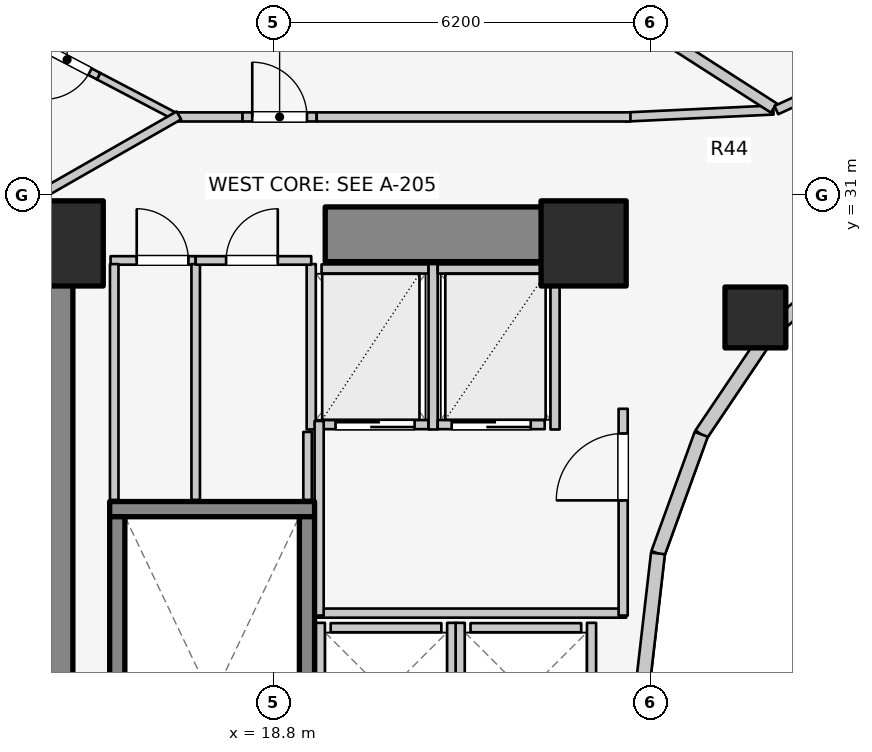
"""IFC4 building model, lengths in metres.
Left out: names, types, materials, properties, quantities, classifications, styles, units other than length and angle.
Written with IfcOpenShell. Run it as: python <this file> out.ifc"""

import sys

from ifc_helpers import new_model, si_unit, direction, frame, frame_2d, origin, origin_2d, place, context, subcontext, project, spatial, rectangle, extrude, element, fill, save


model = new_model("IFC4")
c1 = context("Model", 3, precision=1e-05, world=origin(), true_north=direction((0.0, 1.0)))
c2 = subcontext(c1, "Body", "Model", "MODEL_VIEW")
j1 = project(units=[si_unit("LENGTHUNIT", "METRE"), si_unit("PLANEANGLEUNIT", "RADIAN")], contexts=[c1])
p1 = place(None, origin())
s1 = spatial("IfcSite", under=j1, at=p1, CompositionType="ELEMENT")
p2 = place(p1, origin())
s2 = spatial("IfcBuilding", under=s1, at=p2, CompositionType="ELEMENT")
p3 = place(p2, frame((0.0, 0.0, 52.4)))
s3 = spatial("IfcBuildingStorey", under=s2, at=p3, CompositionType="ELEMENT", Elevation=52.4)
p4 = place(p3, frame((15.05, 17.05, 0.0), z_axis=(0.0, 0.0, 1.0), x_axis=(0.0, 1.0, 0.0)))
e1 = element("IfcWall", 1, at=p4, inside=s3, PredefinedType="SHEAR", context=c2, shape_type="SweptSolid", body=[
    extrude(rectangle(XDim=12.8, YDim=0.9, at=frame_2d((6.4, 0.0))), origin(), (0.0, 0.0, 1.0), 3.1),
])
p5 = place(p3, frame((19.65, 30.35, 0.0), z_axis=(0.0, 0.0, 1.0), x_axis=(1.0, 0.0, 0.0)))
e2 = element("IfcWall", 2, at=p5, inside=s3, PredefinedType="SHEAR", context=c2, shape_type="SweptSolid", body=[
    extrude(rectangle(XDim=4.5, YDim=0.9, at=frame_2d((2.25, 0.0))), origin(), (0.0, 0.0, 1.0), 3.1),
])
p6 = place(p3, frame((16.105, 25.83, 0.0), z_axis=(0.0, 0.0, 1.0), x_axis=(1.0, 0.0, 0.0)))
e3 = element("IfcWall", 3, at=p6, inside=s3, PredefinedType="SOLIDWALL", context=c2, shape_type="SweptSolid", body=[
    extrude(rectangle(XDim=3.37, YDim=0.25, at=frame_2d((1.685, 0.0))), origin(), (0.0, 0.0, 1.0), 3.1),
])
for number, where, z_axis, x_axis in (
    (4, (16.23, 17.895, 0.0), (0.0, 0.0, 1.0), (0.0, 1.0, 0.0)),
    (5, (19.35, 17.895, 0.0), (0.0, 0.0, 1.0), (0.0, 1.0, 0.0)),
):
    element("IfcWall", number, at=place(p3, frame(where, z_axis=z_axis, x_axis=x_axis)), inside=s3, PredefinedType="SOLIDWALL", context=c2, shape_type="SweptSolid", body=[
        extrude(rectangle(XDim=7.81, YDim=0.25, at=frame_2d((3.905, 0.0))), origin(), (0.0, 0.0, 1.0), 3.1),
    ])
for number, where, z_axis, x_axis in (
    (6, (23.9, 30.2, 0.0), (0.0, 0.0, 1.0), (1.0, 0.0, 0.0)),
    (7, (15.3, 30.2, 0.0), (0.0, 0.0, 1.0), (1.0, 0.0, 0.0)),
):
    element("IfcColumn", number, at=place(p3, frame(where, z_axis=z_axis, x_axis=x_axis)), inside=s3, PredefinedType="COLUMN", context=c2, shape_type="SweptSolid", body=[
        extrude(rectangle(XDim=1.4, YDim=1.4, at=origin_2d()), origin(), (0.0, 0.0, 1.0), 3.1),
    ])
p7 = place(p3, frame((26.725, 28.982, 0.0), z_axis=(0.0, 0.0, 1.0), x_axis=(1.0, 0.0, 0.0)))
e8 = element("IfcColumn", 8, at=p7, inside=s3, PredefinedType="COLUMN", context=c2, shape_type="SweptSolid", body=[
    extrude(rectangle(XDim=1.0, YDim=1.0, at=origin_2d()), origin(), (0.0, 0.0, 1.0), 3.1),
])
p8 = place(p3, frame((28.44, 30.032, 0.0), z_axis=(0.0, 0.0, 1.0), x_axis=(-0.752576694707, -0.658504607869, 0.0)))
e9 = element("IfcWall", 9, at=p8, inside=s3, PredefinedType="STANDARD", context=c2, shape_type="SweptSolid", body=[
    extrude(rectangle(XDim=1.959, YDim=0.23, at=frame_2d((0.98, 0.0))), origin(), (0.0, 0.0, 1.0), 1.22),
])
p9 = place(p3, frame((26.965, 28.742, 0.0), z_axis=(0.0, 0.0, 1.0), x_axis=(-0.558197800898, -0.829707909492, 0.0)))
e10 = element("IfcWall", 10, at=p9, inside=s3, PredefinedType="STANDARD", context=c2, shape_type="SweptSolid", body=[
    extrude(rectangle(XDim=2.027, YDim=0.23, at=frame_2d((1.013, 0.0))), origin(), (0.0, 0.0, 1.0), 1.22),
])
p10 = place(p3, frame((25.834, 27.06, 0.0), z_axis=(0.0, 0.0, 1.0), x_axis=(-0.341423187295, -0.93990968033, 0.0)))
e11 = element("IfcWall", 11, at=p10, inside=s3, PredefinedType="STANDARD", context=c2, shape_type="SweptSolid", body=[
    extrude(rectangle(XDim=2.084, YDim=0.23, at=frame_2d((1.042, 0.0))), origin(), (0.0, 0.0, 1.0), 2.56),
])
p11 = place(p3, frame((25.123, 25.102, 0.0), z_axis=(0.0, 0.0, 1.0), x_axis=(-0.114711713601, -0.993398823617, 0.0)))
e12 = element("IfcWall", 12, at=p11, inside=s3, PredefinedType="STANDARD", context=c2, shape_type="SweptSolid", body=[
    extrude(rectangle(XDim=2.115, YDim=0.23, at=frame_2d((1.058, 0.0))), origin(), (0.0, 0.0, 1.0), 2.56),
])
p12 = place(p3, frame((19.74, 23.88, 0.0), z_axis=(0.0, 0.0, 1.0), x_axis=(1.0, 0.0, 0.0)))
e13 = element("IfcWall", 13, at=p12, inside=s3, PredefinedType="SOLIDWALL", context=c2, shape_type="SweptSolid", body=[
    extrude(rectangle(XDim=1.82, YDim=0.15, at=frame_2d((0.91, 0.0))), origin(), (0.0, 0.0, 1.0), 2.575),
])
for number, where, z_axis, x_axis in (
    (14, (19.57, 21.64, 0.0), (0.0, 0.0, 1.0), (0.0, 1.0, 0.0)),
    (15, (21.73, 21.64, 0.0), (0.0, 0.0, 1.0), (0.0, 1.0, 0.0)),
):
    element("IfcWall", number, at=place(p3, frame(where, z_axis=z_axis, x_axis=x_axis)), inside=s3, PredefinedType="SOLIDWALL", context=c2, shape_type="SweptSolid", body=[
        extrude(rectangle(XDim=2.32, YDim=0.15, at=frame_2d((1.16, 0.0))), origin(), (0.0, 0.0, 1.0), 2.575),
    ])
p13 = place(p3, frame((22.04, 23.88, 0.0), z_axis=(0.0, 0.0, 1.0), x_axis=(1.0, 0.0, 0.0)))
e16 = element("IfcWall", 16, at=p13, inside=s3, PredefinedType="SOLIDWALL", context=c2, shape_type="SweptSolid", body=[
    extrude(rectangle(XDim=1.82, YDim=0.15, at=frame_2d((0.91, 0.0))), origin(), (0.0, 0.0, 1.0), 2.12),
])
p14 = place(p3, frame((21.87, 21.64, 0.0), z_axis=(0.0, 0.0, 1.0), x_axis=(0.0, 1.0, 0.0)))
e17 = element("IfcWall", 17, at=p14, inside=s3, PredefinedType="SOLIDWALL", context=c2, shape_type="SweptSolid", body=[
    extrude(rectangle(XDim=2.32, YDim=0.15, at=frame_2d((1.16, 0.0))), origin(), (0.0, 0.0, 1.0), 2.575),
])
p15 = place(p3, frame((24.03, 21.64, 0.0), z_axis=(0.0, 0.0, 1.0), x_axis=(0.0, 1.0, 0.0)))
e18 = element("IfcWall", 18, at=p15, inside=s3, PredefinedType="SOLIDWALL", context=c2, shape_type="SweptSolid", body=[
    extrude(rectangle(XDim=2.32, YDim=0.15, at=frame_2d((1.16, 0.0))), origin(), (0.0, 0.0, 1.0), 2.12),
])
p16 = place(p3, frame((19.59, 27.22, 0.0), z_axis=(0.0, 0.0, 1.0), x_axis=(1.0, 0.0, 0.0)))
e19 = element("IfcWall", 19, at=p16, inside=s3, PredefinedType="SOLIDWALL", context=c2, shape_type="SweptSolid", body=[
    extrude(rectangle(XDim=1.76, YDim=0.15, at=frame_2d((0.88, 0.0))), origin(), (0.0, 0.0, 1.0), 2.575),
])
p17 = place(p16, frame((0.23, 0.0, 0.0)))
e20 = element("IfcOpeningElement", 20, at=p17, cuts=e19, PredefinedType="OPENING", context=c2, shape_type="SweptSolid", body=[
    extrude(rectangle(XDim=1.3, YDim=2.1, at=frame_2d((0.65, 1.05))), frame((0.0, 0.085, 0.0), z_axis=(0.0, -1.0, 0.0), x_axis=(1.0, 0.0, 0.0)), (0.0, 0.0, 1.0), 0.17),
])
p18 = place(p3, frame((19.59, 29.78, 0.0), z_axis=(0.0, 0.0, 1.0), x_axis=(1.0, 0.0, 0.0)))
e21 = element("IfcWall", 21, at=p18, inside=s3, PredefinedType="SOLIDWALL", context=c2, shape_type="SweptSolid", body=[
    extrude(rectangle(XDim=1.76, YDim=0.15, at=frame_2d((0.88, 0.0))), origin(), (0.0, 0.0, 1.0), 2.575),
])
for number, where, z_axis, x_axis in (
    (22, (19.42, 27.14, 0.0), (0.0, 0.0, 1.0), (0.0, 1.0, 0.0)),
    (23, (21.425, 27.14, 0.0), (0.0, 0.0, 1.0), (0.0, 1.0, 0.0)),
):
    element("IfcWall", number, at=place(p3, frame(where, z_axis=z_axis, x_axis=x_axis)), inside=s3, PredefinedType="SOLIDWALL", context=c2, shape_type="SweptSolid", body=[
        extrude(rectangle(XDim=2.72, YDim=0.15, at=frame_2d((1.36, 0.0))), origin(), (0.0, 0.0, 1.0), 2.575),
    ])
p19 = place(p3, frame((21.5, 27.22, 0.0), z_axis=(0.0, 0.0, 1.0), x_axis=(1.0, 0.0, 0.0)))
e24 = element("IfcWall", 24, at=p19, inside=s3, PredefinedType="SOLIDWALL", context=c2, shape_type="SweptSolid", body=[
    extrude(rectangle(XDim=1.76, YDim=0.15, at=frame_2d((0.88, 0.0))), origin(), (0.0, 0.0, 1.0), 2.575),
])
p20 = place(p19, frame((0.23, 0.0, 0.0)))
e25 = element("IfcOpeningElement", 25, at=p20, cuts=e24, PredefinedType="OPENING", context=c2, shape_type="SweptSolid", body=[
    extrude(rectangle(XDim=1.3, YDim=2.1, at=frame_2d((0.65, 1.05))), frame((0.0, 0.085, 0.0), z_axis=(0.0, -1.0, 0.0), x_axis=(1.0, 0.0, 0.0)), (0.0, 0.0, 1.0), 0.17),
])
p21 = place(p3, frame((21.5, 29.78, 0.0), z_axis=(0.0, 0.0, 1.0), x_axis=(1.0, 0.0, 0.0)))
e26 = element("IfcWall", 26, at=p21, inside=s3, PredefinedType="SOLIDWALL", context=c2, shape_type="SweptSolid", body=[
    extrude(rectangle(XDim=1.76, YDim=0.15, at=frame_2d((0.88, 0.0))), origin(), (0.0, 0.0, 1.0), 2.575),
])
p22 = place(p3, frame((23.43, 27.14, 0.0), z_axis=(0.0, 0.0, 1.0), x_axis=(0.0, 1.0, 0.0)))
e27 = element("IfcWall", 27, at=p22, inside=s3, PredefinedType="SOLIDWALL", context=c2, shape_type="SweptSolid", body=[
    extrude(rectangle(XDim=2.72, YDim=0.15, at=frame_2d((1.36, 0.0))), origin(), (0.0, 0.0, 1.0), 2.575),
])
p23 = place(p3, frame((19.52, 24.12, 0.0), z_axis=(0.0, 0.0, 1.0), x_axis=(1.0, 0.0, 0.0)))
e28 = element("IfcWall", 28, at=p23, inside=s3, PredefinedType="PARTITIONING", context=c2, shape_type="SweptSolid", body=[
    extrude(rectangle(XDim=5.08, YDim=0.15, at=frame_2d((2.54, 0.0))), origin(), (0.0, 0.0, 1.0), 2.12),
])
p24 = place(p3, frame((19.55, 24.08, 0.0), z_axis=(0.0, 0.0, 1.0), x_axis=(0.0, 1.0, 0.0)))
e29 = element("IfcWall", 29, at=p24, inside=s3, PredefinedType="PARTITIONING", context=c2, shape_type="SweptSolid", body=[
    extrude(rectangle(XDim=3.2, YDim=0.15, at=frame_2d((1.6, 0.0))), origin(), (0.0, 0.0, 1.0), 2.575),
])
p25 = place(p3, frame((24.55, 24.08, 0.0), z_axis=(0.0, 0.0, 1.0), x_axis=(0.0, 1.0, 0.0)))
e30 = element("IfcWall", 30, at=p25, inside=s3, PredefinedType="PARTITIONING", context=c2, shape_type="SweptSolid", body=[
    extrude(rectangle(XDim=3.4, YDim=0.15, at=frame_2d((1.7, 0.0))), origin(), (0.0, 0.0, 1.0), 2.575),
])
p26 = place(p25, frame((1.894, 0.0, 0.0)))
e31 = element("IfcOpeningElement", 31, at=p26, cuts=e30, PredefinedType="OPENING", context=c2, shape_type="SweptSolid", body=[
    extrude(rectangle(XDim=1.1, YDim=2.1, at=frame_2d((0.55, 1.05))), frame((0.0, 0.085, 0.0), z_axis=(0.0, -1.0, 0.0), x_axis=(1.0, 0.0, 0.0)), (0.0, 0.0, 1.0), 0.17),
])
p27 = place(p3, frame((16.12, 29.92, 0.0), z_axis=(0.0, 0.0, 1.0), x_axis=(1.0, 0.0, 0.0)))
e32 = element("IfcWall", 32, at=p27, inside=s3, PredefinedType="PLUMBINGWALL", context=c2, shape_type="SweptSolid", body=[
    extrude(rectangle(XDim=1.4, YDim=0.14, at=frame_2d((0.7, 0.0))), origin(), (0.0, 0.0, 1.0), 2.575),
])
p28 = place(p27, frame((0.43, 0.0, 0.0)))
e33 = element("IfcOpeningElement", 33, at=p28, cuts=e32, PredefinedType="OPENING", context=c2, shape_type="SweptSolid", body=[
    extrude(rectangle(XDim=0.85, YDim=2.05, at=frame_2d((0.425, 1.025))), frame((0.0, 0.08, 0.0), z_axis=(0.0, -1.0, 0.0), x_axis=(1.0, 0.0, 0.0)), (0.0, 0.0, 1.0), 0.16),
])
for number, where, z_axis, x_axis in (
    (34, (16.18, 25.98, 0.0), (0.0, 0.0, 1.0), (0.0, 1.0, 0.0)),
    (35, (17.52, 25.98, 0.0), (0.0, 0.0, 1.0), (0.0, 1.0, 0.0)),
):
    element("IfcWall", number, at=place(p3, frame(where, z_axis=z_axis, x_axis=x_axis)), inside=s3, PredefinedType="PLUMBINGWALL", context=c2, shape_type="SweptSolid", body=[
        extrude(rectangle(XDim=3.88, YDim=0.14, at=frame_2d((1.94, 0.0))), origin(), (0.0, 0.0, 1.0), 2.575),
    ])
p29 = place(p3, frame((17.52, 29.92, 0.0), z_axis=(0.0, 0.0, 1.0), x_axis=(1.0, 0.0, 0.0)))
e36 = element("IfcWall", 36, at=p29, inside=s3, PredefinedType="PLUMBINGWALL", context=c2, shape_type="SweptSolid", body=[
    extrude(rectangle(XDim=1.9, YDim=0.14, at=frame_2d((0.95, 0.0))), origin(), (0.0, 0.0, 1.0), 2.575),
])
p30 = place(p29, frame((0.5, 0.0, 0.0)))
e37 = element("IfcOpeningElement", 37, at=p30, cuts=e36, PredefinedType="OPENING", context=c2, shape_type="SweptSolid", body=[
    extrude(rectangle(XDim=0.85, YDim=2.05, at=frame_2d((0.425, 1.025))), frame((0.0, 0.08, 0.0), z_axis=(0.0, -1.0, 0.0), x_axis=(1.0, 0.0, 0.0)), (0.0, 0.0, 1.0), 0.16),
])
p31 = place(p3, frame((19.36, 25.98, 0.0), z_axis=(0.0, 0.0, 1.0), x_axis=(0.0, 1.0, 0.0)))
e38 = element("IfcWall", 38, at=p31, inside=s3, PredefinedType="PLUMBINGWALL", context=c2, shape_type="SweptSolid", body=[
    extrude(rectangle(XDim=1.12, YDim=0.14, at=frame_2d((0.56, 0.0))), origin(), (0.0, 0.0, 1.0), 2.575),
])
p32 = place(p3, frame((17.244, 32.257, 0.0), z_axis=(0.0, 0.0, 1.0), x_axis=(-0.885552742751, 0.464538846391, 0.0)))
e39 = element("IfcWall", 39, at=p32, inside=s3, PredefinedType="MOVABLE", context=c2, shape_type="SweptSolid", body=[
    extrude(rectangle(XDim=1.492, YDim=0.12, at=frame_2d((0.746, 0.0))), origin(), (0.0, 0.0, 1.0), 2.575),
])
p33 = place(p3, frame((15.923, 32.95, 0.0), z_axis=(0.0, 0.0, 1.0), x_axis=(-0.885533150024, 0.464576194191, 0.0)))
e40 = element("IfcWall", 40, at=p33, inside=s3, PredefinedType="MOVABLE", context=c2, shape_type="SweptSolid", body=[
    extrude(rectangle(XDim=1.17, YDim=0.12, at=frame_2d((0.585, 0.0))), origin(), (0.0, 0.0, 1.0), 2.11),
])
p34 = place(p33, frame((0.16, 0.0, 0.0)))
e41 = element("IfcOpeningElement", 41, at=p34, cuts=e40, PredefinedType="OPENING", context=c2, shape_type="SweptSolid", body=[
    extrude(rectangle(XDim=0.85, YDim=2.05, at=frame_2d((0.425, 1.025))), frame((0.0, 0.07, 0.0), z_axis=(0.0, -1.0, 0.0), x_axis=(1.0, 0.0, 0.0)), (0.0, 0.0, 1.0), 0.14),
])
p35 = place(p3, frame((27.02, 32.394, 0.0), z_axis=(0.0, 0.0, 1.0), x_axis=(-0.998877427952, -0.047369651964, 0.0)))
e42 = element("IfcWall", 42, at=p35, inside=s3, PredefinedType="PARTITIONING", context=c2, shape_type="SweptSolid", body=[
    extrude(rectangle(XDim=2.433, YDim=0.15, at=frame_2d((1.216, 0.0))), origin(), (0.0, 0.0, 1.0), 1.957),
])
p36 = place(p3, frame((17.15, 32.28, 0.0), z_axis=(0.0, 0.0, 1.0), x_axis=(1.0, 0.0, 0.0)))
e43 = element("IfcWall", 43, at=p36, inside=s3, PredefinedType="PARTITIONING", context=c2, shape_type="SweptSolid", body=[
    extrude(rectangle(XDim=1.14, YDim=0.15, at=frame_2d((0.57, 0.0))), origin(), (0.0, 0.0, 1.0), 2.575),
])
p37 = place(p3, frame((18.29, 32.28, 0.0), z_axis=(0.0, 0.0, 1.0), x_axis=(1.0, 0.0, 0.0)))
e44 = element("IfcWall", 44, at=p37, inside=s3, PredefinedType="PARTITIONING", context=c2, shape_type="SweptSolid", body=[
    extrude(rectangle(XDim=1.22, YDim=0.15, at=frame_2d((0.61, 0.0))), origin(), (0.0, 0.0, 1.0), 2.575),
])
p38 = place(p37, frame((0.16, 0.0, 0.0)))
e45 = element("IfcOpeningElement", 45, at=p38, cuts=e44, PredefinedType="OPENING", context=c2, shape_type="SweptSolid", body=[
    extrude(rectangle(XDim=0.9, YDim=2.1, at=frame_2d((0.45, 1.05))), frame((0.0, 0.085, 0.0), z_axis=(0.0, -1.0, 0.0), x_axis=(1.0, 0.0, 0.0)), (0.0, 0.0, 1.0), 0.17),
])
p39 = place(p3, frame((19.51, 32.28, 0.0), z_axis=(0.0, 0.0, 1.0), x_axis=(1.0, 0.0, 0.0)))
e46 = element("IfcWall", 46, at=p39, inside=s3, PredefinedType="PARTITIONING", context=c2, shape_type="SweptSolid", body=[
    extrude(rectangle(XDim=5.16, YDim=0.15, at=frame_2d((2.58, 0.0))), origin(), (0.0, 0.0, 1.0), 1.957),
])
p40 = place(p3, frame((17.243, 32.305, 0.0), z_axis=(0.0, 0.0, 1.0), x_axis=(-0.867991349648, -0.496579315857, 0.0)))
e47 = element("IfcWall", 47, at=p40, inside=s3, PredefinedType="PARTITIONING", context=c2, shape_type="SweptSolid", body=[
    extrude(rectangle(XDim=2.567, YDim=0.15, at=frame_2d((1.283, 0.0))), origin(), (0.0, 0.0, 1.0), 1.22),
])
p41 = place(p3, frame((27.029, 32.426, 0.0), z_axis=(0.0, 0.0, 1.0), x_axis=(-0.841689919529, 0.5399611832, 0.0)))
e48 = element("IfcWall", 48, at=p41, inside=s3, PredefinedType="PARTITIONING", context=c2, shape_type="SweptSolid", body=[
    extrude(rectangle(XDim=10.058, YDim=0.18, at=frame_2d((5.029, 0.0))), origin(), (0.0, 0.0, 1.0), 1.957),
])
p42 = place(p3, frame((27.503, 32.591, 0.0), z_axis=(0.0, 0.0, 1.0), x_axis=(-0.909645934478, -0.415384489224, 0.0)))
e49 = element("IfcWall", 49, at=p42, inside=s3, PredefinedType="PARTITIONING", context=c2, shape_type="SweptSolid", body=[
    extrude(rectangle(XDim=0.477, YDim=0.15, at=frame_2d((0.238, 0.0))), origin(), (0.0, 0.0, 1.0), 2.575),
])
p43 = place(p17, origin())
e50 = element("IfcDoor", 50, at=p43, inside=s3, OperationType="DOUBLE_DOOR_SLIDING", PredefinedType="DOOR", context=c2, shape_type="SweptSolid", body=[
    extrude(rectangle(XDim=1.3, YDim=2.1, at=frame_2d((0.65, 1.05))), frame((0.0, 0.025, 0.0), z_axis=(0.0, -1.0, 0.0), x_axis=(1.0, 0.0, 0.0)), (0.0, 0.0, 1.0), 0.05),
])
fill(e20, e50)
p44 = place(p20, origin())
e51 = element("IfcDoor", 51, at=p44, inside=s3, OperationType="DOUBLE_DOOR_SLIDING", PredefinedType="DOOR", context=c2, shape_type="SweptSolid", body=[
    extrude(rectangle(XDim=1.3, YDim=2.1, at=frame_2d((0.65, 1.05))), frame((0.0, 0.025, 0.0), z_axis=(0.0, -1.0, 0.0), x_axis=(1.0, 0.0, 0.0)), (0.0, 0.0, 1.0), 0.05),
])
fill(e25, e51)
p45 = place(p26, origin())
e52 = element("IfcDoor", 52, at=p45, inside=s3, OperationType="SINGLE_SWING_LEFT", PredefinedType="DOOR", context=c2, shape_type="SweptSolid", body=[
    extrude(rectangle(XDim=1.1, YDim=2.1, at=frame_2d((0.55, 1.05))), frame((0.0, 0.025, 0.0), z_axis=(0.0, -1.0, 0.0), x_axis=(1.0, 0.0, 0.0)), (0.0, 0.0, 1.0), 0.05),
])
fill(e31, e52)
p46 = place(p28, origin())
e53 = element("IfcDoor", 53, at=p46, inside=s3, OperationType="SINGLE_SWING_LEFT", PredefinedType="DOOR", context=c2, shape_type="SweptSolid", body=[
    extrude(rectangle(XDim=0.85, YDim=2.05, at=frame_2d((0.425, 1.025))), frame((0.0, 0.025, 0.0), z_axis=(0.0, -1.0, 0.0), x_axis=(1.0, 0.0, 0.0)), (0.0, 0.0, 1.0), 0.05),
])
fill(e33, e53)
p47 = place(p30, origin())
e54 = element("IfcDoor", 54, at=p47, inside=s3, OperationType="SINGLE_SWING_RIGHT", PredefinedType="DOOR", context=c2, shape_type="SweptSolid", body=[
    extrude(rectangle(XDim=0.85, YDim=2.05, at=frame_2d((0.425, 1.025))), frame((0.0, 0.025, 0.0), z_axis=(0.0, -1.0, 0.0), x_axis=(1.0, 0.0, 0.0)), (0.0, 0.0, 1.0), 0.05),
])
fill(e37, e54)
p48 = place(p34, origin())
e55 = element("IfcDoor", 55, at=p48, inside=s3, OperationType="SINGLE_SWING_RIGHT", PredefinedType="DOOR", context=c2, shape_type="SweptSolid", body=[
    extrude(rectangle(XDim=0.85, YDim=2.05, at=frame_2d((0.425, 1.025))), frame((0.0, 0.025, 0.0), z_axis=(0.0, -1.0, 0.0), x_axis=(1.0, 0.0, 0.0)), (0.0, 0.0, 1.0), 0.05),
])
fill(e41, e55)
p49 = place(p38, origin())
e56 = element("IfcDoor", 56, at=p49, inside=s3, OperationType="SINGLE_SWING_LEFT", PredefinedType="DOOR", context=c2, shape_type="SweptSolid", body=[
    extrude(rectangle(XDim=0.9, YDim=2.1, at=frame_2d((0.45, 1.05))), frame((0.0, 0.025, 0.0), z_axis=(0.0, -1.0, 0.0), x_axis=(1.0, 0.0, 0.0)), (0.0, 0.0, 1.0), 0.05),
])
fill(e45, e56)
save(model, sys.argv[1])
